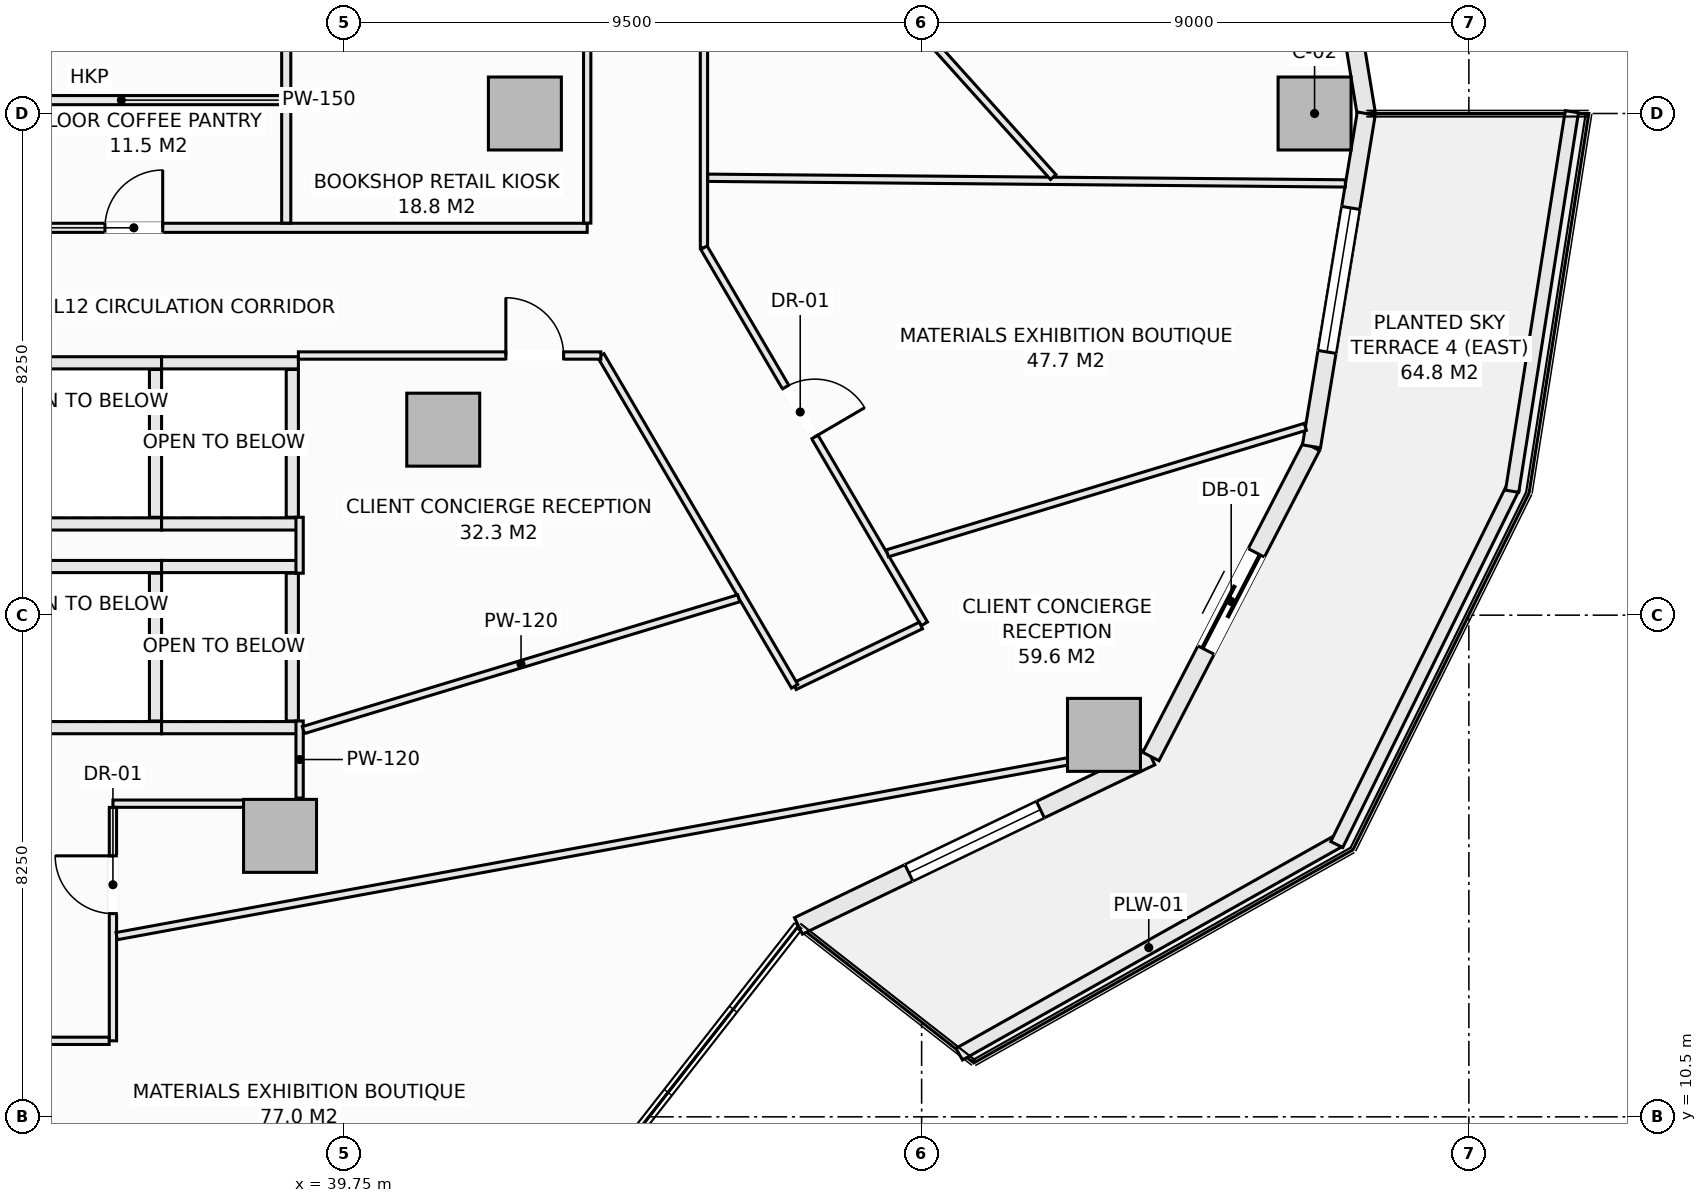
"""IFC4 building model, lengths in metres.
Left out: names, types, materials, properties, quantities, classifications, styles, units other than length and angle.
Written with IfcOpenShell. Run it as: python <this file> out.ifc"""

import sys

from ifc_helpers import new_model, si_unit, direction, frame, frame_2d, origin, origin_2d, place, context, subcontext, project, spatial, rectangle, extrude, element, fill, save


model = new_model("IFC4")
c1 = context("Model", 3, precision=1e-05, world=origin(), true_north=direction((0.0, 1.0)))
c2 = subcontext(c1, "Body", "Model", "MODEL_VIEW")
j1 = project(units=[si_unit("LENGTHUNIT", "METRE"), si_unit("PLANEANGLEUNIT", "RADIAN")], contexts=[c1])
p1 = place(None, origin())
s1 = spatial("IfcSite", under=j1, at=p1, CompositionType="ELEMENT")
p2 = place(p1, origin())
s2 = spatial("IfcBuilding", under=s1, at=p2, CompositionType="ELEMENT")
p3 = place(p2, frame((0.0, 0.0, 53.45)))
s3 = spatial("IfcBuildingStorey", under=s2, at=p3, CompositionType="ELEMENT", Elevation=53.45)
for number, where, z_axis, x_axis in (
    (1, (55.712, 27.0, -0.28), (0.0, 0.0, 1.0), (1.0, 0.0, 0.0)),
    (2, (52.249, 16.781, -0.28), (0.0, 0.0, 1.0), (1.0, 0.0, 0.0)),
    (3, (42.725, 27.0, -0.28), (0.0, 0.0, 1.0), (1.0, 0.0, 0.0)),
    (4, (38.698, 15.121, -0.28), (0.0, 0.0, 1.0), (1.0, 0.0, 0.0)),
    (5, (41.382, 21.801, -0.28), (0.0, 0.0, 1.0), (1.0, 0.0, 0.0)),
):
    element("IfcColumn", number, at=place(p3, frame(where, z_axis=z_axis, x_axis=x_axis)), inside=s3, PredefinedType="COLUMN", context=c2, shape_type="SweptSolid", body=[
        extrude(rectangle(XDim=1.2, YDim=1.2, at=origin_2d()), origin(), (0.0, 0.0, 1.0), 3.85),
    ])
p4 = place(p3, frame((55.662, 32.474, 0.0), z_axis=(0.0, 0.0, 1.0), x_axis=(0.162386212206, -0.986727276447, 0.0)))
e6 = element("IfcWall", 6, at=p4, inside=s3, PredefinedType="SOLIDWALL", context=c2, shape_type="SweptSolid", body=[
    extrude(rectangle(XDim=5.548, YDim=0.3, at=frame_2d((2.774, 0.0))), origin(), (0.0, 0.0, 1.0), 3.093),
])
p5 = place(p4, frame((1.574, 0.0, 0.85)))
e7 = element("IfcOpeningElement", 7, at=p5, cuts=e6, PredefinedType="OPENING", context=c2, shape_type="SweptSolid", body=[
    extrude(rectangle(XDim=2.4, YDim=1.9, at=frame_2d((1.2, 0.95))), frame((0.0, 0.16, 0.0), z_axis=(0.0, -1.0, 0.0), x_axis=(1.0, 0.0, 0.0)), (0.0, 0.0, 1.0), 0.32),
])
p6 = place(p3, frame((47.224, 13.64, 0.0), z_axis=(0.0, 0.0, 1.0), x_axis=(0.901354747727, 0.433081538224, 0.0)))
e8 = element("IfcWall", 8, at=p6, inside=s3, PredefinedType="SOLIDWALL", context=c2, shape_type="SweptSolid", body=[
    extrude(rectangle(XDim=6.431, YDim=0.3, at=frame_2d((3.215, 0.0))), origin(), (0.0, 0.0, 1.0), 3.093),
])
p7 = place(p6, frame((2.015, 0.0, 0.85)))
e9 = element("IfcOpeningElement", 9, at=p7, cuts=e8, PredefinedType="OPENING", context=c2, shape_type="SweptSolid", body=[
    extrude(rectangle(XDim=2.4, YDim=1.9, at=frame_2d((1.2, 0.95))), frame((0.0, 0.16, 0.0), z_axis=(0.0, -1.0, 0.0), x_axis=(1.0, 0.0, 0.0)), (0.0, 0.0, 1.0), 0.32),
])
p8 = place(p3, frame((53.021, 16.425, 0.0), z_axis=(0.0, 0.0, 1.0), x_axis=(0.459800981414, 0.888021991558, 0.0)))
e10 = element("IfcWall", 10, at=p8, inside=s3, PredefinedType="SOLIDWALL", context=c2, shape_type="SweptSolid", body=[
    extrude(rectangle(XDim=5.744, YDim=0.3, at=frame_2d((2.872, 0.0))), origin(), (0.0, 0.0, 1.0), 3.093),
])
p9 = place(p8, frame((1.972, 0.0, 0.0)))
e11 = element("IfcOpeningElement", 11, at=p9, cuts=e10, PredefinedType="OPENING", context=c2, shape_type="SweptSolid", body=[
    extrude(rectangle(XDim=1.8, YDim=2.25, at=frame_2d((0.9, 1.125))), frame((0.0, 0.16, 0.0), z_axis=(0.0, -1.0, 0.0), x_axis=(1.0, 0.0, 0.0)), (0.0, 0.0, 1.0), 0.32),
])
p10 = place(p3, frame((55.662, 21.526, 0.0), z_axis=(0.0, 0.0, 1.0), x_axis=(0.162386212206, 0.986727276447, 0.0)))
e12 = element("IfcWall", 12, at=p10, inside=s3, PredefinedType="SOLIDWALL", context=c2, shape_type="SweptSolid", body=[
    extrude(rectangle(XDim=5.548, YDim=0.3, at=frame_2d((2.774, 0.0))), origin(), (0.0, 0.0, 1.0), 3.093),
])
p11 = place(p10, frame((1.574, 0.0, 0.85)))
e13 = element("IfcOpeningElement", 13, at=p11, cuts=e12, PredefinedType="OPENING", context=c2, shape_type="SweptSolid", body=[
    extrude(rectangle(XDim=2.4, YDim=1.9, at=frame_2d((1.2, 0.95))), frame((0.0, 0.16, 0.0), z_axis=(0.0, -1.0, 0.0), x_axis=(1.0, 0.0, 0.0)), (0.0, 0.0, 1.0), 0.32),
])
p12 = place(p3, frame((49.868, 11.531, 0.0), z_axis=(0.0, 0.0, 1.0), x_axis=(0.871775109335, 0.489906275468, 0.0)))
e14 = element("IfcWall", 14, at=p12, inside=s3, PredefinedType="PARAPET", context=c2, shape_type="SweptSolid", body=[
    extrude(rectangle(XDim=7.152, YDim=0.22, at=frame_2d((3.576, 0.0))), origin(), (0.0, 0.0, 1.0), 0.52),
])
p13 = place(p3, frame((56.077, 14.979, 0.0), z_axis=(0.0, 0.0, 1.0), x_axis=(0.442686636348, 0.89667638644, 0.0)))
e15 = element("IfcWall", 15, at=p13, inside=s3, PredefinedType="PARAPET", context=c2, shape_type="SweptSolid", body=[
    extrude(rectangle(XDim=6.545, YDim=0.22, at=frame_2d((3.272, 0.0))), origin(), (0.0, 0.0, 1.0), 0.52),
])
p14 = place(p3, frame((58.962, 20.788, 0.0), z_axis=(0.0, 0.0, 1.0), x_axis=(0.15545655238, 0.987842730561, 0.0)))
e16 = element("IfcWall", 16, at=p14, inside=s3, PredefinedType="PARAPET", context=c2, shape_type="SweptSolid", body=[
    extrude(rectangle(XDim=6.318, YDim=0.22, at=frame_2d((3.159, 0.0))), origin(), (0.0, 0.0, 1.0), 0.52),
])
for number, where, z_axis, x_axis in (
    (17, (34.5, 19.55, 0.0), (0.0, 0.0, 1.0), (1.0, 0.0, 0.0)),
    (18, (34.5, 16.9, 0.0), (0.0, 0.0, 1.0), (1.0, 0.0, 0.0)),
):
    element("IfcWall", number, at=place(p3, frame(where, z_axis=z_axis, x_axis=x_axis)), inside=s3, PredefinedType="SOLIDWALL", context=c2, shape_type="SweptSolid", body=[
        extrude(rectangle(XDim=2.25, YDim=0.2, at=frame_2d((1.125, 0.0))), origin(), (0.0, 0.0, 1.0), 3.57),
    ])
p15 = place(p3, frame((36.65, 17.01, 0.0), z_axis=(0.0, 0.0, 1.0), x_axis=(0.0, 1.0, 0.0)))
e19 = element("IfcWall", 19, at=p15, inside=s3, PredefinedType="SOLIDWALL", context=c2, shape_type="SweptSolid", body=[
    extrude(rectangle(XDim=2.43, YDim=0.2, at=frame_2d((1.215, 0.0))), origin(), (0.0, 0.0, 1.0), 3.57),
])
for number, where, z_axis, x_axis in (
    (20, (36.75, 19.55, 0.0), (0.0, 0.0, 1.0), (1.0, 0.0, 0.0)),
    (21, (36.75, 16.9, 0.0), (0.0, 0.0, 1.0), (1.0, 0.0, 0.0)),
):
    element("IfcWall", number, at=place(p3, frame(where, z_axis=z_axis, x_axis=x_axis)), inside=s3, PredefinedType="SOLIDWALL", context=c2, shape_type="SweptSolid", body=[
        extrude(rectangle(XDim=2.25, YDim=0.2, at=frame_2d((1.125, 0.0))), origin(), (0.0, 0.0, 1.0), 3.57),
    ])
p16 = place(p3, frame((38.9, 17.01, 0.0), z_axis=(0.0, 0.0, 1.0), x_axis=(0.0, 1.0, 0.0)))
e22 = element("IfcWall", 22, at=p16, inside=s3, PredefinedType="SOLIDWALL", context=c2, shape_type="SweptSolid", body=[
    extrude(rectangle(XDim=2.43, YDim=0.2, at=frame_2d((1.215, 0.0))), origin(), (0.0, 0.0, 1.0), 3.57),
])
for number, where, z_axis, x_axis in (
    (23, (34.5, 22.9, 0.0), (0.0, 0.0, 1.0), (1.0, 0.0, 0.0)),
    (24, (34.5, 20.25, 0.0), (0.0, 0.0, 1.0), (1.0, 0.0, 0.0)),
):
    element("IfcWall", number, at=place(p3, frame(where, z_axis=z_axis, x_axis=x_axis)), inside=s3, PredefinedType="SOLIDWALL", context=c2, shape_type="SweptSolid", body=[
        extrude(rectangle(XDim=2.25, YDim=0.2, at=frame_2d((1.125, 0.0))), origin(), (0.0, 0.0, 1.0), 3.57),
    ])
p17 = place(p3, frame((36.65, 20.36, 0.0), z_axis=(0.0, 0.0, 1.0), x_axis=(0.0, 1.0, 0.0)))
e25 = element("IfcWall", 25, at=p17, inside=s3, PredefinedType="SOLIDWALL", context=c2, shape_type="SweptSolid", body=[
    extrude(rectangle(XDim=2.43, YDim=0.2, at=frame_2d((1.215, 0.0))), origin(), (0.0, 0.0, 1.0), 3.57),
])
for number, where, z_axis, x_axis in (
    (26, (36.75, 22.9, 0.0), (0.0, 0.0, 1.0), (1.0, 0.0, 0.0)),
    (27, (36.75, 20.25, 0.0), (0.0, 0.0, 1.0), (1.0, 0.0, 0.0)),
):
    element("IfcWall", number, at=place(p3, frame(where, z_axis=z_axis, x_axis=x_axis)), inside=s3, PredefinedType="SOLIDWALL", context=c2, shape_type="SweptSolid", body=[
        extrude(rectangle(XDim=2.25, YDim=0.2, at=frame_2d((1.125, 0.0))), origin(), (0.0, 0.0, 1.0), 3.57),
    ])
p18 = place(p3, frame((38.9, 20.36, 0.0), z_axis=(0.0, 0.0, 1.0), x_axis=(0.0, 1.0, 0.0)))
e28 = element("IfcWall", 28, at=p18, inside=s3, PredefinedType="SOLIDWALL", context=c2, shape_type="SweptSolid", body=[
    extrude(rectangle(XDim=2.43, YDim=0.2, at=frame_2d((1.215, 0.0))), origin(), (0.0, 0.0, 1.0), 3.57),
])
p19 = place(p3, frame((33.377, 25.12, 0.0), z_axis=(0.0, 0.0, 1.0), x_axis=(1.0, 0.0, 0.0)))
e29 = element("IfcWall", 29, at=p19, inside=s3, PredefinedType="PARTITIONING", context=c2, shape_type="SweptSolid", body=[
    extrude(rectangle(XDim=10.373, YDim=0.15, at=frame_2d((5.187, 0.0))), origin(), (0.0, 0.0, 1.0), 3.57),
])
p20 = place(p19, frame((2.441, 0.0, 0.0)))
e30 = element("IfcOpeningElement", 30, at=p20, cuts=e29, PredefinedType="OPENING", context=c2, shape_type="SweptSolid", body=[
    extrude(rectangle(XDim=0.95, YDim=2.1, at=frame_2d((0.475, 1.05))), frame((0.0, 0.085, 0.0), z_axis=(0.0, -1.0, 0.0), x_axis=(1.0, 0.0, 0.0)), (0.0, 0.0, 1.0), 0.17),
])
p21 = place(p3, frame((33.377, 27.22, 0.0), z_axis=(0.0, 0.0, 1.0), x_axis=(1.0, 0.0, 0.0)))
e31 = element("IfcWall", 31, at=p21, inside=s3, PredefinedType="PARTITIONING", context=c2, shape_type="SweptSolid", body=[
    extrude(rectangle(XDim=5.423, YDim=0.15, at=frame_2d((2.711, 0.0))), origin(), (0.0, 0.0, 1.0), 3.57),
])
p22 = place(p3, frame((38.8, 25.197, 0.0), z_axis=(0.0, 0.0, 1.0), x_axis=(0.0, 1.0, 0.0)))
e32 = element("IfcWall", 32, at=p22, inside=s3, PredefinedType="PARTITIONING", context=c2, shape_type="SweptSolid", body=[
    extrude(rectangle(XDim=1.946, YDim=0.15, at=frame_2d((0.973, 0.0))), origin(), (0.0, 0.0, 1.0), 3.57),
])
p23 = place(p3, frame((38.8, 27.297, 0.0), z_axis=(0.0, 0.0, 1.0), x_axis=(0.0, 1.0, 0.0)))
e33 = element("IfcWall", 33, at=p23, inside=s3, PredefinedType="PARTITIONING", context=c2, shape_type="SweptSolid", body=[
    extrude(rectangle(XDim=1.546, YDim=0.15, at=frame_2d((0.773, 0.0))), origin(), (0.0, 0.0, 1.0), 3.57),
])
p24 = place(p3, frame((35.95, 15.65, 0.0), z_axis=(0.0, 0.0, 1.0), x_axis=(1.0, 0.0, 0.0)))
e34 = element("IfcWall", 34, at=p24, inside=s3, PredefinedType="PARTITIONING", context=c2, shape_type="SweptSolid", body=[
    extrude(rectangle(XDim=2.291, YDim=0.12, at=frame_2d((1.146, 0.0))), origin(), (0.0, 0.0, 1.0), 3.57),
])
p25 = place(p3, frame((35.95, 11.75, 0.0), z_axis=(0.0, 0.0, 1.0), x_axis=(0.0, 1.0, 0.0)))
e35 = element("IfcWall", 35, at=p25, inside=s3, PredefinedType="PARTITIONING", context=c2, shape_type="SweptSolid", body=[
    extrude(rectangle(XDim=3.838, YDim=0.12, at=frame_2d((1.919, 0.0))), origin(), (0.0, 0.0, 1.0), 3.57),
])
p26 = place(p25, frame((2.092, 0.0, 0.0)))
e36 = element("IfcOpeningElement", 36, at=p26, cuts=e35, PredefinedType="OPENING", context=c2, shape_type="SweptSolid", body=[
    extrude(rectangle(XDim=0.95, YDim=2.1, at=frame_2d((0.475, 1.05))), frame((0.0, 0.07, 0.0), z_axis=(0.0, -1.0, 0.0), x_axis=(1.0, 0.0, 0.0)), (0.0, 0.0, 1.0), 0.14),
])
p27 = place(p3, frame((27.242, 11.75, 0.0), z_axis=(0.0, 0.0, 1.0), x_axis=(1.0, 0.0, 0.0)))
e37 = element("IfcWall", 37, at=p27, inside=s3, PredefinedType="PARTITIONING", context=c2, shape_type="SweptSolid", body=[
    extrude(rectangle(XDim=8.646, YDim=0.12, at=frame_2d((4.323, 0.0))), origin(), (0.0, 0.0, 1.0), 3.57),
])
p28 = place(p27, frame((2.322, 0.0, 0.0)))
e38 = element("IfcOpeningElement", 38, at=p28, cuts=e37, PredefinedType="OPENING", context=c2, shape_type="SweptSolid", body=[
    extrude(rectangle(XDim=0.95, YDim=2.1, at=frame_2d((0.475, 1.05))), frame((0.0, 0.07, 0.0), z_axis=(0.0, -1.0, 0.0), x_axis=(1.0, 0.0, 0.0)), (0.0, 0.0, 1.0), 0.14),
])
p29 = place(p27, frame((6.167, 0.0, 0.0)))
e39 = element("IfcOpeningElement", 39, at=p29, cuts=e37, PredefinedType="OPENING", context=c2, shape_type="SweptSolid", body=[
    extrude(rectangle(XDim=0.95, YDim=2.1, at=frame_2d((0.475, 1.05))), frame((0.0, 0.07, 0.0), z_axis=(0.0, -1.0, 0.0), x_axis=(1.0, 0.0, 0.0)), (0.0, 0.0, 1.0), 0.14),
])
p30 = place(p3, frame((45.67, 24.793, 0.0), z_axis=(0.0, 0.0, 1.0), x_axis=(0.0, 1.0, 0.0)))
e40 = element("IfcWall", 40, at=p30, inside=s3, PredefinedType="PARTITIONING", context=c2, shape_type="SweptSolid", body=[
    extrude(rectangle(XDim=4.414, YDim=0.12, at=frame_2d((2.207, 0.0))), origin(), (0.0, 0.0, 1.0), 3.57),
])
p31 = place(p3, frame((45.67, 24.793, 0.0), z_axis=(0.0, 0.0, 1.0), x_axis=(0.505584917928, -0.862776848764, 0.0)))
e41 = element("IfcWall", 41, at=p31, inside=s3, PredefinedType="PARTITIONING", context=c2, shape_type="SweptSolid", body=[
    extrude(rectangle(XDim=7.17, YDim=0.12, at=frame_2d((3.585, 0.0))), origin(), (0.0, 0.0, 1.0), 3.57),
])
p32 = place(p31, frame((2.656, 0.0, 0.0)))
e42 = element("IfcOpeningElement", 42, at=p32, cuts=e41, PredefinedType="OPENING", context=c2, shape_type="SweptSolid", body=[
    extrude(rectangle(XDim=0.95, YDim=2.1, at=frame_2d((0.475, 1.05))), frame((0.0, 0.07, 0.0), z_axis=(0.0, -1.0, 0.0), x_axis=(1.0, 0.0, 0.0)), (0.0, 0.0, 1.0), 0.14),
])
p33 = place(p3, frame((47.161, 17.581, 0.0), z_axis=(0.0, 0.0, 1.0), x_axis=(0.901265146481, 0.433267972204, 0.0)))
e43 = element("IfcWall", 43, at=p33, inside=s3, PredefinedType="PARTITIONING", context=c2, shape_type="SweptSolid", body=[
    extrude(rectangle(XDim=2.306, YDim=0.12, at=frame_2d((1.153, 0.0))), origin(), (0.0, 0.0, 1.0), 3.57),
])
p34 = place(p3, frame((43.974, 23.02, 0.0), z_axis=(0.0, 0.0, 1.0), x_axis=(0.505531634194, -0.862808070679, 0.0)))
e44 = element("IfcWall", 44, at=p34, inside=s3, PredefinedType="PARTITIONING", context=c2, shape_type="SweptSolid", body=[
    extrude(rectangle(XDim=6.304, YDim=0.12, at=frame_2d((3.152, 0.0))), origin(), (0.0, 0.0, 1.0), 3.205),
])
p35 = place(p3, frame((39.0, 23.02, 0.0), z_axis=(0.0, 0.0, 1.0), x_axis=(1.0, 0.0, 0.0)))
e45 = element("IfcWall", 45, at=p35, inside=s3, PredefinedType="PARTITIONING", context=c2, shape_type="SweptSolid", body=[
    extrude(rectangle(XDim=4.974, YDim=0.12, at=frame_2d((2.487, 0.0))), origin(), (0.0, 0.0, 1.0), 3.57),
])
p36 = place(p35, frame((3.412, 0.0, 0.0)))
e46 = element("IfcOpeningElement", 46, at=p36, cuts=e45, PredefinedType="OPENING", context=c2, shape_type="SweptSolid", body=[
    extrude(rectangle(XDim=0.95, YDim=2.1, at=frame_2d((0.475, 1.05))), frame((0.0, 0.07, 0.0), z_axis=(0.0, -1.0, 0.0), x_axis=(1.0, 0.0, 0.0)), (0.0, 0.0, 1.0), 0.14),
])
p37 = place(p3, frame((39.02, 15.742, 0.0), z_axis=(0.0, 0.0, 1.0), x_axis=(0.0, 1.0, 0.0)))
e47 = element("IfcWall", 47, at=p37, inside=s3, PredefinedType="PARTITIONING", context=c2, shape_type="SweptSolid", body=[
    extrude(rectangle(XDim=1.268, YDim=0.12, at=frame_2d((0.634, 0.0))), origin(), (0.0, 0.0, 1.0), 2.934),
])
p38 = place(p3, frame((39.02, 19.44, 0.0), z_axis=(0.0, 0.0, 1.0), x_axis=(0.0, 1.0, 0.0)))
e48 = element("IfcWall", 48, at=p38, inside=s3, PredefinedType="PARTITIONING", context=c2, shape_type="SweptSolid", body=[
    extrude(rectangle(XDim=0.92, YDim=0.12, at=frame_2d((0.46, 0.0))), origin(), (0.0, 0.0, 1.0), 3.57),
])
p39 = place(p3, frame((43.75, 25.197, 0.0), z_axis=(0.0, 0.0, 1.0), x_axis=(0.0, 1.0, 0.0)))
e49 = element("IfcWall", 49, at=p39, inside=s3, PredefinedType="PARTITIONING", context=c2, shape_type="SweptSolid", body=[
    extrude(rectangle(XDim=3.646, YDim=0.12, at=frame_2d((1.823, 0.0))), origin(), (0.0, 0.0, 1.0), 3.57),
])
p40 = place(p3, frame((45.732, 25.943, 0.0), z_axis=(0.0, 0.0, 1.0), x_axis=(0.999960667943, -0.008869192068, 0.0)))
e50 = element("IfcWall", 50, at=p40, inside=s3, PredefinedType="PARTITIONING", context=c2, shape_type="SweptSolid", body=[
    extrude(rectangle(XDim=10.488, YDim=0.12, at=frame_2d((5.244, 0.0))), origin(), (0.0, 0.0, 1.0), 3.57),
])
p41 = place(p3, frame((39.082, 16.86, 0.0), z_axis=(0.0, 0.0, 1.0), x_axis=(0.957120973048, 0.289688527476, 0.0)))
e51 = element("IfcWall", 51, at=p41, inside=s3, PredefinedType="PARTITIONING", context=c2, shape_type="SweptSolid", body=[
    extrude(rectangle(XDim=7.48, YDim=0.12, at=frame_2d((3.74, 0.0))), origin(), (0.0, 0.0, 1.0), 3.57),
])
p42 = place(p3, frame((48.687, 19.767, 0.0), z_axis=(0.0, 0.0, 1.0), x_axis=(0.957123563014, 0.28967997018, 0.0)))
e52 = element("IfcWall", 52, at=p42, inside=s3, PredefinedType="PARTITIONING", context=c2, shape_type="SweptSolid", body=[
    extrude(rectangle(XDim=7.181, YDim=0.12, at=frame_2d((3.591, 0.0))), origin(), (0.0, 0.0, 1.0), 3.57),
])
p43 = place(p3, frame((36.012, 13.472, 0.0), z_axis=(0.0, 0.0, 1.0), x_axis=(0.983545247648, 0.180661965641, 0.0)))
e53 = element("IfcWall", 53, at=p43, inside=s3, PredefinedType="PARTITIONING", context=c2, shape_type="SweptSolid", body=[
    extrude(rectangle(XDim=17.073, YDim=0.12, at=frame_2d((8.537, 0.0))), origin(), (0.0, 0.0, 1.0), 3.093),
])
p44 = place(p3, frame((32.408, 11.688, 0.0), z_axis=(0.0, 0.0, 1.0), x_axis=(0.625707614962, -0.780057677725, 0.0)))
e54 = element("IfcWall", 54, at=p44, inside=s3, PredefinedType="PARTITIONING", context=c2, shape_type="SweptSolid", body=[
    extrude(rectangle(XDim=6.436, YDim=0.12, at=frame_2d((3.218, 0.0))), origin(), (0.0, 0.0, 1.0), 3.57),
])
p45 = place(p3, frame((46.939, 30.933, 0.0), z_axis=(0.0, 0.0, 1.0), x_axis=(0.668545536635, -0.743671207891, 0.0)))
e55 = element("IfcWall", 55, at=p45, inside=s3, PredefinedType="PARTITIONING", context=c2, shape_type="SweptSolid", body=[
    extrude(rectangle(XDim=6.695, YDim=0.12, at=frame_2d((3.347, 0.0))), origin(), (0.0, 0.0, 1.0), 3.57),
])
p46 = place(p7, origin())
e56 = element("IfcWindow", 56, at=p46, inside=s3, PartitioningType="SINGLE_PANEL", PredefinedType="WINDOW", context=c2, shape_type="SweptSolid", body=[
    extrude(rectangle(XDim=2.4, YDim=1.9, at=frame_2d((1.2, 0.95))), frame((0.0, 0.03, 0.0), z_axis=(0.0, -1.0, 0.0), x_axis=(1.0, 0.0, 0.0)), (0.0, 0.0, 1.0), 0.06),
])
fill(e9, e56)
p47 = place(p9, frame((1.8, 0.0, 0.0), z_axis=(0.0, 0.0, 1.0), x_axis=(-1.0, 0.0, 0.0)))
e57 = element("IfcDoor", 57, at=p47, inside=s3, OperationType="SLIDING_TO_LEFT", PredefinedType="DOOR", context=c2, shape_type="SweptSolid", body=[
    extrude(rectangle(XDim=1.8, YDim=2.25, at=frame_2d((0.9, 1.125))), frame((0.0, 0.025, 0.0), z_axis=(0.0, -1.0, 0.0), x_axis=(1.0, 0.0, 0.0)), (0.0, 0.0, 1.0), 0.05),
])
fill(e11, e57)
p48 = place(p11, origin())
e58 = element("IfcWindow", 58, at=p48, inside=s3, PartitioningType="SINGLE_PANEL", PredefinedType="WINDOW", context=c2, shape_type="SweptSolid", body=[
    extrude(rectangle(XDim=2.4, YDim=1.9, at=frame_2d((1.2, 0.95))), frame((0.0, 0.03, 0.0), z_axis=(0.0, -1.0, 0.0), x_axis=(1.0, 0.0, 0.0)), (0.0, 0.0, 1.0), 0.06),
])
fill(e13, e58)
p49 = place(p20, origin())
e59 = element("IfcDoor", 59, at=p49, inside=s3, OperationType="SINGLE_SWING_RIGHT", PredefinedType="DOOR", context=c2, shape_type="SweptSolid", body=[
    extrude(rectangle(XDim=0.95, YDim=2.1, at=frame_2d((0.475, 1.05))), frame((0.0, 0.025, 0.0), z_axis=(0.0, -1.0, 0.0), x_axis=(1.0, 0.0, 0.0)), (0.0, 0.0, 1.0), 0.05),
])
fill(e30, e59)
p50 = place(p26, origin())
e60 = element("IfcDoor", 60, at=p50, inside=s3, OperationType="SINGLE_SWING_RIGHT", PredefinedType="DOOR", context=c2, shape_type="SweptSolid", body=[
    extrude(rectangle(XDim=0.95, YDim=2.1, at=frame_2d((0.475, 1.05))), frame((0.0, 0.025, 0.0), z_axis=(0.0, -1.0, 0.0), x_axis=(1.0, 0.0, 0.0)), (0.0, 0.0, 1.0), 0.05),
])
fill(e36, e60)
p51 = place(p36, origin())
e61 = element("IfcDoor", 61, at=p51, inside=s3, OperationType="SINGLE_SWING_LEFT", PredefinedType="DOOR", context=c2, shape_type="SweptSolid", body=[
    extrude(rectangle(XDim=0.95, YDim=2.1, at=frame_2d((0.475, 1.05))), frame((0.0, 0.025, 0.0), z_axis=(0.0, -1.0, 0.0), x_axis=(1.0, 0.0, 0.0)), (0.0, 0.0, 1.0), 0.05),
])
fill(e46, e61)
p52 = place(p32, origin())
e62 = element("IfcDoor", 62, at=p52, inside=s3, OperationType="SINGLE_SWING_RIGHT", PredefinedType="DOOR", context=c2, shape_type="SweptSolid", body=[
    extrude(rectangle(XDim=0.95, YDim=2.1, at=frame_2d((0.475, 1.05))), frame((0.0, 0.025, 0.0), z_axis=(0.0, -1.0, 0.0), x_axis=(1.0, 0.0, 0.0)), (0.0, 0.0, 1.0), 0.05),
])
fill(e42, e62)
save(model, sys.argv[1])
